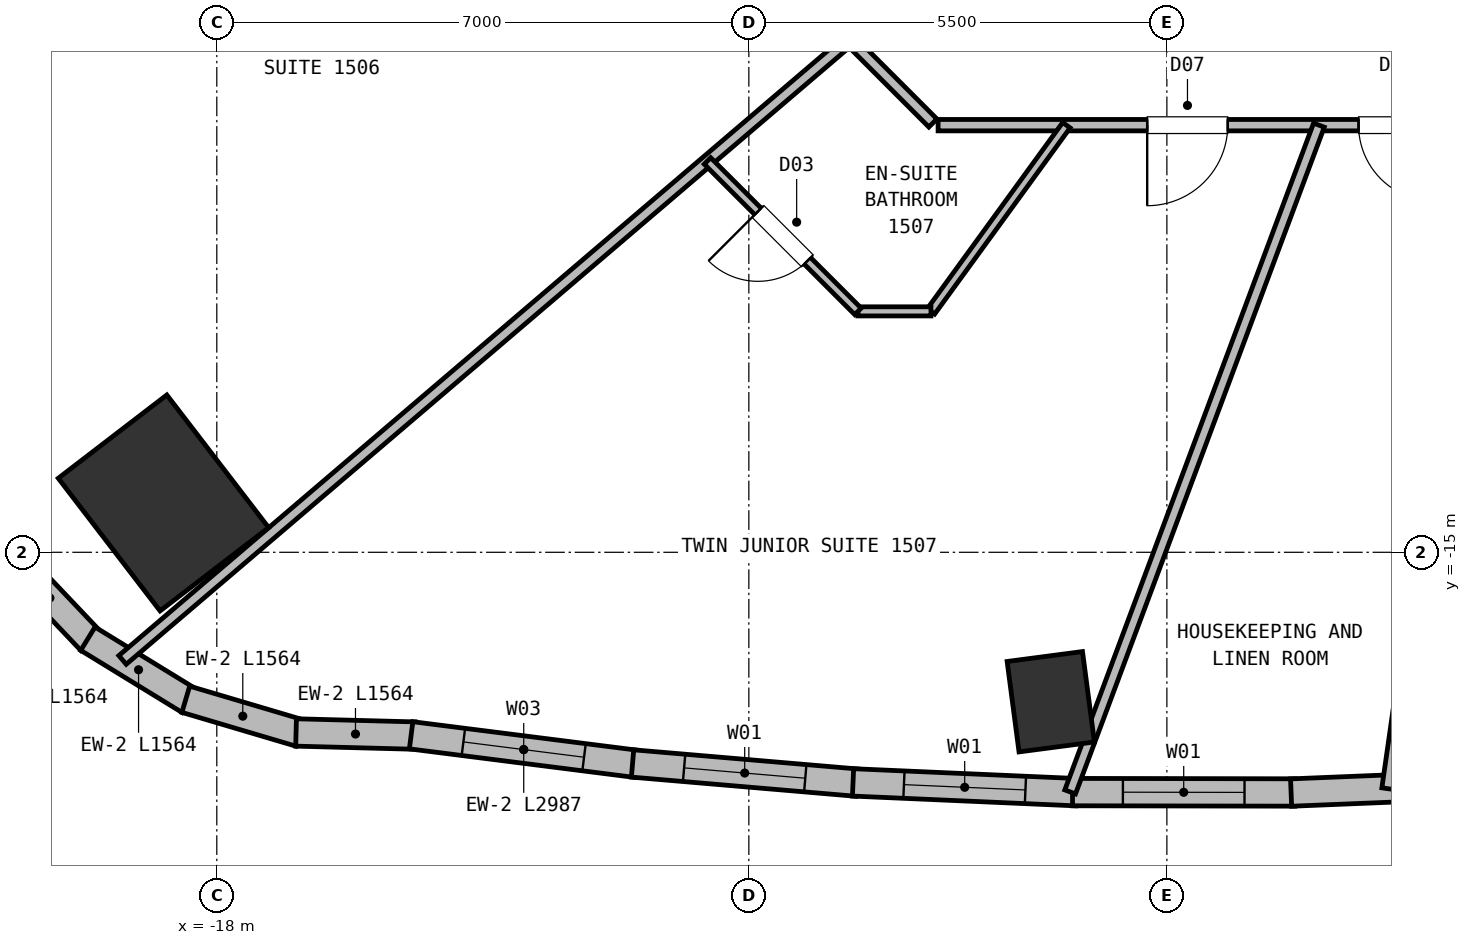
"""IFC4 building model, lengths in metres.
Left out: names, types, materials, properties, quantities, classifications, styles, units other than length and angle.
Written with IfcOpenShell. Run it as: python <this file> out.ifc"""

import sys

from ifc_helpers import new_model, si_unit, direction, frame, frame_2d, origin, origin_2d, place, context, subcontext, project, spatial, rectangle, extrude, element, fill, save


model = new_model("IFC4")
c1 = context("Model", 3, precision=1e-05, world=origin(), true_north=direction((0.0, 1.0)))
c2 = subcontext(c1, "Body", "Model", "MODEL_VIEW")
j1 = project(units=[si_unit("LENGTHUNIT", "METRE"), si_unit("PLANEANGLEUNIT", "RADIAN")], contexts=[c1])
p1 = place(None, origin())
s1 = spatial("IfcSite", under=j1, at=p1, CompositionType="ELEMENT")
p2 = place(p1, origin())
s2 = spatial("IfcBuilding", under=s1, at=p2, CompositionType="ELEMENT")
p3 = place(p2, frame((0.0, 0.0, 53.0)))
s3 = spatial("IfcBuildingStorey", under=s2, at=p3, CompositionType="ELEMENT", Elevation=53.0)
p4 = place(p3, frame((-18.702, -14.351, 0.0), z_axis=(0.0, 0.0, 1.0), x_axis=(0.793353340291, 0.608761429009, 0.0)))
e1 = element("IfcColumn", 1, at=p4, inside=s3, PredefinedType="COLUMN", context=c2, shape_type="SweptSolid", body=[
    extrude(rectangle(XDim=1.8, YDim=2.2, at=origin_2d()), origin(), (0.0, 0.0, 1.0), 3.75),
])
p5 = place(p3, frame((-7.028, -16.966, 0.0), z_axis=(0.0, 0.0, 1.0), x_axis=(0.991444861374, 0.13052619222, 0.0)))
e2 = element("IfcColumn", 2, at=p5, inside=s3, PredefinedType="COLUMN", context=c2, shape_type="SweptSolid", body=[
    extrude(rectangle(XDim=1.0, YDim=1.2, at=origin_2d()), origin(), (0.0, 0.0, 1.0), 3.75),
])
for number, where, z_axis, x_axis in (
    (3, (-19.658, -16.168, 0.0), (0.0, 0.0, 1.0), (-0.688, 0.725, 0.0)),
    (4, (-18.363, -16.954, 0.0), (0.0, 0.0, 1.0), (-0.853, 0.522, 0.0)),
):
    element("IfcWall", number, at=place(p3, frame(where, z_axis=z_axis, x_axis=x_axis)), inside=s3, PredefinedType="SOLIDWALL", context=c2, shape_type="SweptSolid", body=[
        extrude(rectangle(XDim=1.564, YDim=0.36, at=frame_2d((0.782, 0.0))), origin(), (0.0, 0.0, 1.0), 3.5),
    ])
for number, where, z_axis, x_axis in (
    (5, (-16.908, -17.378, 0.0), (0.0, 0.0, 1.0), (-0.959, 0.284, 0.0)),
    (6, (-15.394, -17.412, 0.0), (0.0, 0.0, 1.0), (-1.0, 0.026, 0.0)),
):
    element("IfcWall", number, at=place(p3, frame(where, z_axis=z_axis, x_axis=x_axis)), inside=s3, PredefinedType="SOLIDWALL", context=c2, shape_type="SweptSolid", body=[
        extrude(rectangle(XDim=1.564, YDim=0.36, at=frame_2d((0.782, 0.0))), origin(), (0.0, 0.0, 1.0), 3.5),
    ])
p6 = place(p3, frame((-12.48, -17.784, 0.0), z_axis=(0.0, 0.0, 1.0), x_axis=(-0.992056250625, 0.125795053943, 0.0)))
e7 = element("IfcWall", 7, at=p6, inside=s3, PredefinedType="SOLIDWALL", context=c2, shape_type="SweptSolid", body=[
    extrude(rectangle(XDim=2.987, YDim=0.36, at=frame_2d((1.493, 0.0))), origin(), (0.0, 0.0, 1.0), 3.5),
])
p7 = place(p6, frame((0.694, 0.0, 0.72)))
e8 = element("IfcOpeningElement", 8, at=p7, cuts=e7, PredefinedType="OPENING", context=c2, shape_type="SweptSolid", body=[
    extrude(rectangle(XDim=1.6, YDim=1.88, at=frame_2d((0.8, 0.94))), frame((0.0, 0.19, 0.0), z_axis=(0.0, -1.0, 0.0), x_axis=(1.0, 0.0, 0.0)), (0.0, 0.0, 1.0), 0.38),
])
p8 = place(p3, frame((-9.579, -18.031, 0.0), z_axis=(0.0, 0.0, 1.0), x_axis=(-0.996359665783, 0.085249143105, 0.0)))
e9 = element("IfcWall", 9, at=p8, inside=s3, PredefinedType="SOLIDWALL", context=c2, shape_type="SweptSolid", body=[
    extrude(rectangle(XDim=2.961, YDim=0.36, at=frame_2d((1.48, 0.0))), origin(), (0.0, 0.0, 1.0), 3.5),
])
p9 = place(p8, frame((0.681, 0.0, 0.72)))
e10 = element("IfcOpeningElement", 10, at=p9, cuts=e9, PredefinedType="OPENING", context=c2, shape_type="SweptSolid", body=[
    extrude(rectangle(XDim=1.6, YDim=1.88, at=frame_2d((0.8, 0.94))), frame((0.0, 0.19, 0.0), z_axis=(0.0, -1.0, 0.0), x_axis=(1.0, 0.0, 0.0)), (0.0, 0.0, 1.0), 0.38),
])
p10 = place(p3, frame((-6.691, -18.156, 0.0), z_axis=(0.0, 0.0, 1.0), x_axis=(-0.999038849602, 0.043833514425, 0.0)))
e11 = element("IfcWall", 11, at=p10, inside=s3, PredefinedType="SOLIDWALL", context=c2, shape_type="SweptSolid", body=[
    extrude(rectangle(XDim=2.941, YDim=0.36, at=frame_2d((1.47, 0.0))), origin(), (0.0, 0.0, 1.0), 3.5),
])
p11 = place(p10, frame((0.67, 0.0, 0.72)))
e12 = element("IfcOpeningElement", 12, at=p11, cuts=e11, PredefinedType="OPENING", context=c2, shape_type="SweptSolid", body=[
    extrude(rectangle(XDim=1.6, YDim=1.88, at=frame_2d((0.8, 0.94))), frame((0.0, 0.19, 0.0), z_axis=(0.0, -1.0, 0.0), x_axis=(1.0, 0.0, 0.0)), (0.0, 0.0, 1.0), 0.38),
])
p12 = place(p3, frame((-3.816, -18.16, 0.0), z_axis=(0.0, 0.0, 1.0), x_axis=(-0.999998606938, 0.001669168097, 0.0)))
e13 = element("IfcWall", 13, at=p12, inside=s3, PredefinedType="SOLIDWALL", context=c2, shape_type="SweptSolid", body=[
    extrude(rectangle(XDim=2.925, YDim=0.36, at=frame_2d((1.463, 0.0))), origin(), (0.0, 0.0, 1.0), 3.5),
])
p13 = place(p12, frame((0.663, 0.0, 0.72)))
e14 = element("IfcOpeningElement", 14, at=p13, cuts=e13, PredefinedType="OPENING", context=c2, shape_type="SweptSolid", body=[
    extrude(rectangle(XDim=1.6, YDim=1.88, at=frame_2d((0.8, 0.94))), frame((0.0, 0.19, 0.0), z_axis=(0.0, -1.0, 0.0), x_axis=(1.0, 0.0, 0.0)), (0.0, 0.0, 1.0), 0.38),
])
p14 = place(p3, frame((-0.953, -18.043, 0.0), z_axis=(0.0, 0.0, 1.0), x_axis=(-0.99917451841, -0.040623660108, 0.0)))
e15 = element("IfcWall", 15, at=p14, inside=s3, PredefinedType="SOLIDWALL", context=c2, shape_type="SweptSolid", body=[
    extrude(rectangle(XDim=2.915, YDim=0.36, at=frame_2d((1.458, 0.0))), origin(), (0.0, 0.0, 1.0), 3.5),
])
p15 = place(p3, frame((8.51, -9.38, 0.0), z_axis=(0.0, 0.0, 1.0), x_axis=(-1.0, 0.0, 0.0)))
e16 = element("IfcWall", 16, at=p15, inside=s3, PredefinedType="PARTITIONING", context=c2, shape_type="SweptSolid", body=[
    extrude(rectangle(XDim=17.02, YDim=0.15, at=frame_2d((8.51, 0.0))), origin(), (0.0, 0.0, 1.0), 3.5),
])
p16 = place(p15, frame((8.419, 0.0, 0.0)))
e17 = element("IfcOpeningElement", 17, at=p16, cuts=e16, PredefinedType="OPENING", context=c2, shape_type="SweptSolid", body=[
    extrude(rectangle(XDim=0.95, YDim=2.1, at=frame_2d((0.475, 1.05))), frame((0.0, 0.085, 0.0), z_axis=(0.0, -1.0, 0.0), x_axis=(1.0, 0.0, 0.0)), (0.0, 0.0, 1.0), 0.17),
])
p17 = place(p15, frame((10.488, 0.0, 0.0)))
e18 = element("IfcOpeningElement", 18, at=p17, cuts=e16, PredefinedType="OPENING", context=c2, shape_type="SweptSolid", body=[
    extrude(rectangle(XDim=1.0, YDim=2.15, at=frame_2d((0.5, 1.075))), frame((0.0, 0.085, 0.0), z_axis=(0.0, -1.0, 0.0), x_axis=(1.0, 0.0, 0.0)), (0.0, 0.0, 1.0), 0.17),
])
p18 = place(p15, frame((3.015, 0.0, 0.0)))
e19 = element("IfcOpeningElement", 19, at=p18, cuts=e16, PredefinedType="OPENING", context=c2, shape_type="SweptSolid", body=[
    extrude(rectangle(XDim=1.06, YDim=2.15, at=frame_2d((0.53, 1.075))), frame((0.0, 0.085, 0.0), z_axis=(0.0, -1.0, 0.0), x_axis=(1.0, 0.0, 0.0)), (0.0, 0.0, 1.0), 0.17),
])
p19 = place(p15, frame((13.209, 0.0, 0.0)))
e20 = element("IfcOpeningElement", 20, at=p19, cuts=e16, PredefinedType="OPENING", context=c2, shape_type="SweptSolid", body=[
    extrude(rectangle(XDim=1.06, YDim=2.15, at=frame_2d((0.53, 1.075))), frame((0.0, 0.085, 0.0), z_axis=(0.0, -1.0, 0.0), x_axis=(1.0, 0.0, 0.0)), (0.0, 0.0, 1.0), 0.17),
])
p20 = place(p3, frame((-8.578, -9.352, 0.0), z_axis=(0.0, 0.0, 1.0), x_axis=(-0.707067066127, 0.707146494016, 0.0)))
e21 = element("IfcWall", 21, at=p20, inside=s3, PredefinedType="PARTITIONING", context=c2, shape_type="SweptSolid", body=[
    extrude(rectangle(XDim=3.074, YDim=0.15, at=frame_2d((1.537, 0.0))), origin(), (0.0, 0.0, 1.0), 3.5),
])
p21 = place(p3, frame((-9.675, -8.255, 0.0), z_axis=(0.0, 0.0, 1.0), x_axis=(-0.760712977927, -0.649088410937, 0.0)))
e22 = element("IfcWall", 22, at=p21, inside=s3, PredefinedType="PARTITIONING", context=c2, shape_type="SweptSolid", body=[
    extrude(rectangle(XDim=12.574, YDim=0.15, at=frame_2d((6.287, 0.0))), origin(), (0.0, 0.0, 1.0), 3.5),
])
p22 = place(p3, frame((-8.604, -11.83, 0.0), z_axis=(0.0, 0.0, 1.0), x_axis=(0.58812378006, 0.808770931307, 0.0)))
e23 = element("IfcWall", 23, at=p22, inside=s3, PredefinedType="PARTITIONING", context=c2, shape_type="SweptSolid", body=[
    extrude(rectangle(XDim=3.03, YDim=0.12, at=frame_2d((1.515, 0.0))), origin(), (0.0, 0.0, 1.0), 3.5),
])
p23 = place(p3, frame((-8.604, -11.83, 0.0), z_axis=(0.0, 0.0, 1.0), x_axis=(-1.0, 0.0, 0.0)))
e24 = element("IfcWall", 24, at=p23, inside=s3, PredefinedType="PARTITIONING", context=c2, shape_type="SweptSolid", body=[
    extrude(rectangle(XDim=0.961, YDim=0.12, at=frame_2d((0.48, 0.0))), origin(), (0.0, 0.0, 1.0), 3.5),
])
p24 = place(p3, frame((-9.565, -11.83, 0.0), z_axis=(0.0, 0.0, 1.0), x_axis=(-0.707150377276, 0.707063182409, 0.0)))
e25 = element("IfcWall", 25, at=p24, inside=s3, PredefinedType="PARTITIONING", context=c2, shape_type="SweptSolid", body=[
    extrude(rectangle(XDim=2.8, YDim=0.12, at=frame_2d((1.4, 0.0))), origin(), (0.0, 0.0, 1.0), 3.5),
])
p25 = place(p24, frame((0.94, 0.0, 0.0)))
e26 = element("IfcOpeningElement", 26, at=p25, cuts=e25, PredefinedType="OPENING", context=c2, shape_type="SweptSolid", body=[
    extrude(rectangle(XDim=0.92, YDim=2.1, at=frame_2d((0.46, 1.05))), frame((0.0, 0.07, 0.0), z_axis=(0.0, -1.0, 0.0), x_axis=(1.0, 0.0, 0.0)), (0.0, 0.0, 1.0), 0.14),
])
p26 = place(p3, frame((-3.5, -9.38, 0.0), z_axis=(0.0, 0.0, 1.0), x_axis=(-0.349539963134, -0.936921455711, 0.0)))
e27 = element("IfcWall", 27, at=p26, inside=s3, PredefinedType="PARTITIONING", context=c2, shape_type="SweptSolid", body=[
    extrude(rectangle(XDim=9.364, YDim=0.15, at=frame_2d((4.682, 0.0))), origin(), (0.0, 0.0, 1.0), 3.5),
])
p27 = place(p3, frame((-1.345, -9.38, 0.0), z_axis=(0.0, 0.0, 1.0), x_axis=(-0.141956162639, -0.989872945326, 0.0)))
e28 = element("IfcWall", 28, at=p27, inside=s3, PredefinedType="PARTITIONING", context=c2, shape_type="SweptSolid", body=[
    extrude(rectangle(XDim=8.819, YDim=0.15, at=frame_2d((4.41, 0.0))), origin(), (0.0, 0.0, 1.0), 3.5),
])
p28 = place(p7, origin())
e29 = element("IfcWindow", 29, at=p28, inside=s3, PartitioningType="SINGLE_PANEL", PredefinedType="WINDOW", context=c2, shape_type="SweptSolid", body=[
    extrude(rectangle(XDim=1.6, YDim=1.88, at=frame_2d((0.8, 0.94))), frame((0.0, 0.03, 0.0), z_axis=(0.0, -1.0, 0.0), x_axis=(1.0, 0.0, 0.0)), (0.0, 0.0, 1.0), 0.06),
])
fill(e8, e29)
p29 = place(p9, origin())
e30 = element("IfcWindow", 30, at=p29, inside=s3, PartitioningType="SINGLE_PANEL", PredefinedType="WINDOW", context=c2, shape_type="SweptSolid", body=[
    extrude(rectangle(XDim=1.6, YDim=1.88, at=frame_2d((0.8, 0.94))), frame((0.0, 0.03, 0.0), z_axis=(0.0, -1.0, 0.0), x_axis=(1.0, 0.0, 0.0)), (0.0, 0.0, 1.0), 0.06),
])
fill(e10, e30)
p30 = place(p11, origin())
e31 = element("IfcWindow", 31, at=p30, inside=s3, PartitioningType="SINGLE_PANEL", PredefinedType="WINDOW", context=c2, shape_type="SweptSolid", body=[
    extrude(rectangle(XDim=1.6, YDim=1.88, at=frame_2d((0.8, 0.94))), frame((0.0, 0.03, 0.0), z_axis=(0.0, -1.0, 0.0), x_axis=(1.0, 0.0, 0.0)), (0.0, 0.0, 1.0), 0.06),
])
fill(e12, e31)
p31 = place(p13, origin())
e32 = element("IfcWindow", 32, at=p31, inside=s3, PartitioningType="SINGLE_PANEL", PredefinedType="WINDOW", context=c2, shape_type="SweptSolid", body=[
    extrude(rectangle(XDim=1.6, YDim=1.88, at=frame_2d((0.8, 0.94))), frame((0.0, 0.03, 0.0), z_axis=(0.0, -1.0, 0.0), x_axis=(1.0, 0.0, 0.0)), (0.0, 0.0, 1.0), 0.06),
])
fill(e14, e32)
p32 = place(p25, origin())
e33 = element("IfcDoor", 33, at=p32, inside=s3, OperationType="SINGLE_SWING_RIGHT", PredefinedType="DOOR", context=c2, shape_type="SweptSolid", body=[
    extrude(rectangle(XDim=0.92, YDim=2.1, at=frame_2d((0.46, 1.05))), frame((0.0, 0.025, 0.0), z_axis=(0.0, -1.0, 0.0), x_axis=(1.0, 0.0, 0.0)), (0.0, 0.0, 1.0), 0.05),
])
fill(e26, e33)
p33 = place(p17, origin())
e34 = element("IfcDoor", 34, at=p33, inside=s3, OperationType="SINGLE_SWING_LEFT", PredefinedType="DOOR", context=c2, shape_type="SweptSolid", body=[
    extrude(rectangle(XDim=1.0, YDim=2.15, at=frame_2d((0.5, 1.075))), frame((0.0, 0.025, 0.0), z_axis=(0.0, -1.0, 0.0), x_axis=(1.0, 0.0, 0.0)), (0.0, 0.0, 1.0), 0.05),
])
fill(e18, e34)
p34 = place(p19, origin())
e35 = element("IfcDoor", 35, at=p34, inside=s3, OperationType="SINGLE_SWING_RIGHT", PredefinedType="DOOR", context=c2, shape_type="SweptSolid", body=[
    extrude(rectangle(XDim=1.06, YDim=2.15, at=frame_2d((0.53, 1.075))), frame((0.0, 0.025, 0.0), z_axis=(0.0, -1.0, 0.0), x_axis=(1.0, 0.0, 0.0)), (0.0, 0.0, 1.0), 0.05),
])
fill(e20, e35)
save(model, sys.argv[1])
